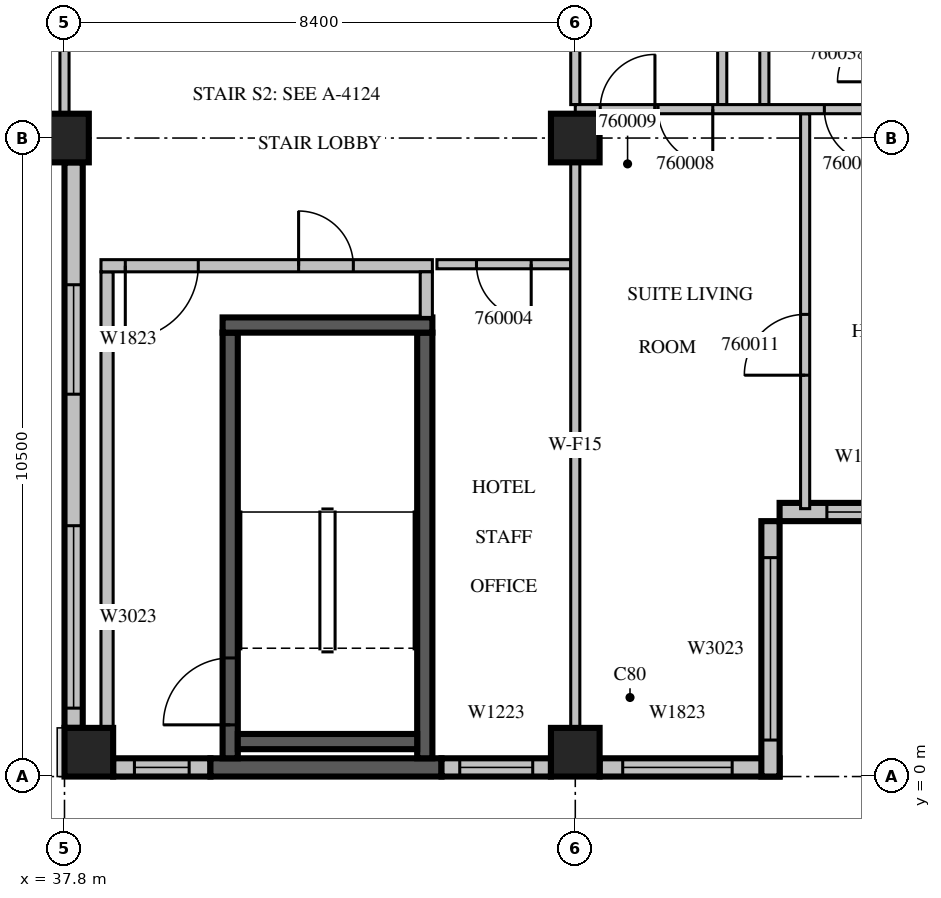
"""IFC4 building model, lengths in metres.
Left out: names, types, materials, properties, quantities, classifications, styles, units other than length and angle.
Written with IfcOpenShell. Run it as: python <this file> out.ifc"""

import sys

from ifc_helpers import new_model, si_unit, direction, frame, frame_2d, origin, origin_2d, place, context, subcontext, project, spatial, rectangle, extrude, source, transform, mapped, element, fill, save


model = new_model("IFC4")
c1 = context("Model", 3, precision=1e-05, world=origin(), true_north=direction((0.0, 1.0)))
c2 = subcontext(c1, "Body", "Model", "MODEL_VIEW")
j1 = project(units=[si_unit("LENGTHUNIT", "METRE"), si_unit("PLANEANGLEUNIT", "RADIAN")], contexts=[c1])
p1 = place(None, origin())
s1 = spatial("IfcSite", under=j1, at=p1, CompositionType="ELEMENT")
p2 = place(p1, origin())
s2 = spatial("IfcBuilding", under=s1, at=p2, CompositionType="ELEMENT")
p3 = place(p2, frame((0.0, 0.0, 261.4)))
s3 = spatial("IfcBuildingStorey", under=s2, at=p3, CompositionType="ELEMENT", Elevation=261.4)
m1 = source(origin(), c2, "Body", "SweptSolid", [
    extrude(rectangle(XDim=0.8, YDim=0.8, at=origin_2d()), origin(), (0.0, 0.0, 1.0), 3.8),
])
for number, where, z_axis, x_axis in (
    (1, (38.2, 0.4, 0.0), (0.0, 0.0, 1.0), (1.0, 0.0, 0.0)),
    (2, (46.2, 0.4, 0.0), (0.0, 0.0, 1.0), (1.0, 0.0, 0.0)),
    (3, (37.8, 10.5, 0.0), (0.0, 0.0, 1.0), (1.0, 0.0, 0.0)),
    (4, (46.2, 10.5, 0.0), (0.0, 0.0, 1.0), (1.0, 0.0, 0.0)),
):
    element("IfcColumn", number, at=place(p3, frame(where, z_axis=z_axis, x_axis=x_axis)), inside=s3, PredefinedType="COLUMN", context=c2, shape_type="MappedRepresentation", body=[
        mapped(m1, transform((0.0, 0.0, 0.0), scale=1.0)),
    ])
m2 = source(origin(), c2, "Body", "SweptSolid", [
    extrude(rectangle(XDim=9.3, YDim=0.3, at=frame_2d((4.65, 0.0))), origin(), (0.0, 0.0, 1.0), 3.4),
])
p4 = place(p3, frame((37.95, 10.1, 0.0), z_axis=(0.0, 0.0, 1.0), x_axis=(0.0, -1.0, 0.0)))
e5 = element("IfcWall", 5, at=p4, inside=s3, PredefinedType="STANDARD", context=c2, shape_type="MappedRepresentation", body=[
    mapped(m2, transform((0.0, 0.0, 0.0), scale=1.0)),
])
m3 = source(origin(), c2, "Body", "SweptSolid", [
    extrude(rectangle(XDim=1.8, YDim=2.3, at=frame_2d((0.9, 1.15))), frame((0.0, 0.16, 0.0), z_axis=(0.0, -1.0, 0.0), x_axis=(1.0, 0.0, 0.0)), (0.0, 0.0, 1.0), 0.32),
])
p5 = place(p4, frame((2.013, 0.0, 0.6)))
e6 = element("IfcOpeningElement", 6, at=p5, cuts=e5, PredefinedType="OPENING", context=c2, shape_type="MappedRepresentation", body=[
    mapped(m3, transform((0.0, 0.0, 0.0), scale=1.0)),
])
m4 = source(origin(), c2, "Body", "SweptSolid", [
    extrude(rectangle(XDim=3.0, YDim=2.3, at=frame_2d((1.5, 1.15))), frame((0.0, 0.16, 0.0), z_axis=(0.0, -1.0, 0.0), x_axis=(1.0, 0.0, 0.0)), (0.0, 0.0, 1.0), 0.32),
])
p6 = place(p4, frame((5.975, 0.0, 0.6)))
e7 = element("IfcOpeningElement", 7, at=p6, cuts=e5, PredefinedType="OPENING", context=c2, shape_type="MappedRepresentation", body=[
    mapped(m4, transform((0.0, 0.0, 0.0), scale=1.0)),
])
m5 = source(origin(), c2, "Body", "SweptSolid", [
    extrude(rectangle(XDim=1.6, YDim=0.3, at=frame_2d((0.8, 0.0))), origin(), (0.0, 0.0, 1.0), 3.4),
])
p7 = place(p3, frame((38.6, 0.15, 0.0), z_axis=(0.0, 0.0, 1.0), x_axis=(1.0, 0.0, 0.0)))
e8 = element("IfcWall", 8, at=p7, inside=s3, PredefinedType="STANDARD", context=c2, shape_type="MappedRepresentation", body=[
    mapped(m5, transform((0.0, 0.0, 0.0), scale=1.0)),
])
m6 = source(origin(), c2, "Body", "SweptSolid", [
    extrude(rectangle(XDim=0.9, YDim=2.3, at=frame_2d((0.45, 1.15))), frame((0.0, 0.16, 0.0), z_axis=(0.0, -1.0, 0.0), x_axis=(1.0, 0.0, 0.0)), (0.0, 0.0, 1.0), 0.32),
])
p8 = place(p7, frame((0.35, 0.0, 0.6)))
e9 = element("IfcOpeningElement", 9, at=p8, cuts=e8, PredefinedType="OPENING", context=c2, shape_type="MappedRepresentation", body=[
    mapped(m6, transform((0.0, 0.0, 0.0), scale=1.0)),
])
m7 = source(origin(), c2, "Body", "SweptSolid", [
    extrude(rectangle(XDim=3.8, YDim=0.3, at=frame_2d((1.9, 0.0))), origin(), (0.0, 0.0, 1.0), 3.4),
])
p9 = place(p3, frame((40.2, 0.15, 0.0), z_axis=(0.0, 0.0, 1.0), x_axis=(1.0, 0.0, 0.0)))
e10 = element("IfcWall", 10, at=p9, inside=s3, PredefinedType="SOLIDWALL", context=c2, shape_type="MappedRepresentation", body=[
    mapped(m7, transform((0.0, 0.0, 0.0), scale=1.0)),
])
m8 = source(origin(), c2, "Body", "SweptSolid", [
    extrude(rectangle(XDim=1.8, YDim=0.3, at=frame_2d((0.9, 0.0))), origin(), (0.0, 0.0, 1.0), 3.4),
])
p10 = place(p3, frame((44.0, 0.15, 0.0), z_axis=(0.0, 0.0, 1.0), x_axis=(1.0, 0.0, 0.0)))
e11 = element("IfcWall", 11, at=p10, inside=s3, PredefinedType="STANDARD", context=c2, shape_type="MappedRepresentation", body=[
    mapped(m8, transform((0.0, 0.0, 0.0), scale=1.0)),
])
m9 = source(origin(), c2, "Body", "SweptSolid", [
    extrude(rectangle(XDim=1.2, YDim=2.3, at=frame_2d((0.6, 1.15))), frame((0.0, 0.16, 0.0), z_axis=(0.0, -1.0, 0.0), x_axis=(1.0, 0.0, 0.0)), (0.0, 0.0, 1.0), 0.32),
])
p11 = place(p10, frame((0.3, 0.0, 0.6)))
e12 = element("IfcOpeningElement", 12, at=p11, cuts=e11, PredefinedType="OPENING", context=c2, shape_type="MappedRepresentation", body=[
    mapped(m9, transform((0.0, 0.0, 0.0), scale=1.0)),
])
m10 = source(origin(), c2, "Body", "SweptSolid", [
    extrude(rectangle(XDim=2.96, YDim=0.3, at=frame_2d((1.48, 0.0))), origin(), (0.0, 0.0, 1.0), 3.4),
])
p12 = place(p3, frame((46.6, 0.15, 0.0), z_axis=(0.0, 0.0, 1.0), x_axis=(1.0, 0.0, 0.0)))
e13 = element("IfcWall", 13, at=p12, inside=s3, PredefinedType="STANDARD", context=c2, shape_type="MappedRepresentation", body=[
    mapped(m10, transform((0.0, 0.0, 0.0), scale=1.0)),
])
p13 = place(p12, frame((0.38, 0.0, 0.6)))
e14 = element("IfcOpeningElement", 14, at=p13, cuts=e13, PredefinedType="OPENING", context=c2, shape_type="MappedRepresentation", body=[
    mapped(m3, transform((0.0, 0.0, 0.0), scale=1.0)),
])
m11 = source(origin(), c2, "Body", "SweptSolid", [
    extrude(rectangle(XDim=4.2, YDim=0.3, at=frame_2d((2.1, 0.0))), origin(), (0.0, 0.0, 1.0), 3.4),
])
p14 = place(p3, frame((49.41, 0.0, 0.0), z_axis=(0.0, 0.0, 1.0), x_axis=(0.0, 1.0, 0.0)))
e15 = element("IfcWall", 15, at=p14, inside=s3, PredefinedType="STANDARD", context=c2, shape_type="MappedRepresentation", body=[
    mapped(m11, transform((0.0, 0.0, 0.0), scale=1.0)),
])
p15 = place(p14, frame((0.6, 0.0, 0.6)))
e16 = element("IfcOpeningElement", 16, at=p15, cuts=e15, PredefinedType="OPENING", context=c2, shape_type="MappedRepresentation", body=[
    mapped(m4, transform((0.0, 0.0, 0.0), scale=1.0)),
])
m12 = source(origin(), c2, "Body", "SweptSolid", [
    extrude(rectangle(XDim=2.52, YDim=0.3, at=frame_2d((1.26, 0.0))), origin(), (0.0, 0.0, 1.0), 3.4),
])
p16 = place(p3, frame((49.56, 4.35, 0.0), z_axis=(0.0, 0.0, 1.0), x_axis=(1.0, 0.0, 0.0)))
e17 = element("IfcWall", 17, at=p16, inside=s3, PredefinedType="STANDARD", context=c2, shape_type="MappedRepresentation", body=[
    mapped(m12, transform((0.0, 0.0, 0.0), scale=1.0)),
])
p17 = place(p16, frame((0.777, 0.0, 0.6)))
e18 = element("IfcOpeningElement", 18, at=p17, cuts=e17, PredefinedType="OPENING", context=c2, shape_type="MappedRepresentation", body=[
    mapped(m9, transform((0.0, 0.0, 0.0), scale=1.0)),
])
m13 = source(origin(), c2, "Body", "SweptSolid", [
    extrude(rectangle(XDim=7.0, YDim=0.25, at=frame_2d((3.5, 0.0))), origin(), (0.0, 0.0, 1.0), 3.4),
])
p18 = place(p3, frame((40.525, 0.3, 0.0), z_axis=(0.0, 0.0, 1.0), x_axis=(0.0, 1.0, 0.0)))
e19 = element("IfcWall", 19, at=p18, inside=s3, PredefinedType="SOLIDWALL", context=c2, shape_type="MappedRepresentation", body=[
    mapped(m13, transform((0.0, 0.0, 0.0), scale=1.0)),
])
m14 = source(origin(), c2, "Body", "SweptSolid", [
    extrude(rectangle(XDim=1.1, YDim=2.1, at=frame_2d((0.55, 1.05))), frame((0.0, 0.135, 0.0), z_axis=(0.0, -1.0, 0.0), x_axis=(1.0, 0.0, 0.0)), (0.0, 0.0, 1.0), 0.27),
])
p19 = place(p18, frame((0.55, 0.0, 0.0)))
e20 = element("IfcOpeningElement", 20, at=p19, cuts=e19, PredefinedType="OPENING", context=c2, shape_type="MappedRepresentation", body=[
    mapped(m14, transform((0.0, 0.0, 0.0), scale=1.0)),
])
p20 = place(p3, frame((43.725, 0.3, 0.0), z_axis=(0.0, 0.0, 1.0), x_axis=(0.0, 1.0, 0.0)))
e21 = element("IfcWall", 21, at=p20, inside=s3, PredefinedType="SOLIDWALL", context=c2, shape_type="MappedRepresentation", body=[
    mapped(m13, transform((0.0, 0.0, 0.0), scale=1.0)),
])
m15 = source(origin(), c2, "Body", "SweptSolid", [
    extrude(rectangle(XDim=3.45, YDim=0.25, at=frame_2d((1.725, 0.0))), origin(), (0.0, 0.0, 1.0), 3.4),
])
p21 = place(p3, frame((40.4, 7.425, 0.0), z_axis=(0.0, 0.0, 1.0), x_axis=(1.0, 0.0, 0.0)))
e22 = element("IfcWall", 22, at=p21, inside=s3, PredefinedType="SOLIDWALL", context=c2, shape_type="MappedRepresentation", body=[
    mapped(m15, transform((0.0, 0.0, 0.0), scale=1.0)),
])
m16 = source(origin(), c2, "Body", "SweptSolid", [
    extrude(rectangle(XDim=2.95, YDim=0.25, at=frame_2d((1.475, 0.0))), origin(), (0.0, 0.0, 1.0), 3.4),
])
p22 = place(p3, frame((40.65, 0.575, 0.0), z_axis=(0.0, 0.0, 1.0), x_axis=(1.0, 0.0, 0.0)))
e23 = element("IfcWall", 23, at=p22, inside=s3, PredefinedType="SOLIDWALL", context=c2, shape_type="MappedRepresentation", body=[
    mapped(m16, transform((0.0, 0.0, 0.0), scale=1.0)),
])
m17 = source(origin(), c2, "Body", "SweptSolid", [
    extrude(rectangle(XDim=8.0, YDim=0.2, at=frame_2d((4.0, 0.0))), origin(), (0.0, 0.0, 1.0), 3.4),
])
p23 = place(p3, frame((38.5, 0.3, 0.0), z_axis=(0.0, 0.0, 1.0), x_axis=(0.0, 1.0, 0.0)))
e24 = element("IfcWall", 24, at=p23, inside=s3, PredefinedType="PARTITIONING", context=c2, shape_type="MappedRepresentation", body=[
    mapped(m17, transform((0.0, 0.0, 0.0), scale=1.0)),
])
m18 = source(origin(), c2, "Body", "SweptSolid", [
    extrude(rectangle(XDim=5.45, YDim=0.2, at=frame_2d((2.725, 0.0))), origin(), (0.0, 0.0, 1.0), 3.4),
])
p24 = place(p3, frame((38.4, 8.4, 0.0), z_axis=(0.0, 0.0, 1.0), x_axis=(1.0, 0.0, 0.0)))
e25 = element("IfcWall", 25, at=p24, inside=s3, PredefinedType="PARTITIONING", context=c2, shape_type="MappedRepresentation", body=[
    mapped(m18, transform((0.0, 0.0, 0.0), scale=1.0)),
])
m19 = source(origin(), c2, "Body", "SweptSolid", [
    extrude(rectangle(XDim=1.2, YDim=2.1, at=frame_2d((0.6, 1.05))), frame((0.0, 0.11, 0.0), z_axis=(0.0, -1.0, 0.0), x_axis=(1.0, 0.0, 0.0)), (0.0, 0.0, 1.0), 0.22),
])
p25 = place(p24, frame((0.4, 0.0, 0.0)))
e26 = element("IfcOpeningElement", 26, at=p25, cuts=e25, PredefinedType="OPENING", context=c2, shape_type="MappedRepresentation", body=[
    mapped(m19, transform((0.0, 0.0, 0.0), scale=1.0)),
])
m20 = source(origin(), c2, "Body", "SweptSolid", [
    extrude(rectangle(XDim=0.9, YDim=2.1, at=frame_2d((0.45, 1.05))), frame((0.0, 0.11, 0.0), z_axis=(0.0, -1.0, 0.0), x_axis=(1.0, 0.0, 0.0)), (0.0, 0.0, 1.0), 0.22),
])
p26 = place(p24, frame((3.25, 0.0, 0.0)))
e27 = element("IfcOpeningElement", 27, at=p26, cuts=e25, PredefinedType="OPENING", context=c2, shape_type="MappedRepresentation", body=[
    mapped(m20, transform((0.0, 0.0, 0.0), scale=1.0)),
])
m21 = source(origin(), c2, "Body", "SweptSolid", [
    extrude(rectangle(XDim=0.75, YDim=0.2, at=frame_2d((0.375, 0.0))), origin(), (0.0, 0.0, 1.0), 3.4),
])
p27 = place(p3, frame((43.75, 7.55, 0.0), z_axis=(0.0, 0.0, 1.0), x_axis=(0.0, 1.0, 0.0)))
e28 = element("IfcWall", 28, at=p27, inside=s3, PredefinedType="PARTITIONING", context=c2, shape_type="MappedRepresentation", body=[
    mapped(m21, transform((0.0, 0.0, 0.0), scale=1.0)),
])
m22 = source(origin(), c2, "Body", "SweptSolid", [
    extrude(rectangle(XDim=2.2, YDim=0.15, at=frame_2d((1.1, 0.0))), origin(), (0.0, 0.0, 1.0), 3.4),
])
p28 = place(p3, frame((46.125, 8.425, 0.0), z_axis=(0.0, 0.0, 1.0), x_axis=(-1.0, 0.0, 0.0)))
e29 = element("IfcWall", 29, at=p28, inside=s3, PredefinedType="PARTITIONING", context=c2, shape_type="MappedRepresentation", body=[
    mapped(m22, transform((0.0, 0.0, 0.0), scale=1.0)),
])
m23 = source(origin(), c2, "Body", "SweptSolid", [
    extrude(rectangle(XDim=0.9, YDim=2.1, at=frame_2d((0.45, 1.05))), frame((0.0, 0.085, 0.0), z_axis=(0.0, -1.0, 0.0), x_axis=(1.0, 0.0, 0.0)), (0.0, 0.0, 1.0), 0.17),
])
p29 = place(p28, frame((0.65, 0.0, 0.0)))
e30 = element("IfcOpeningElement", 30, at=p29, cuts=e29, PredefinedType="OPENING", context=c2, shape_type="MappedRepresentation", body=[
    mapped(m23, transform((0.0, 0.0, 0.0), scale=1.0)),
])
m24 = source(origin(), c2, "Body", "SweptSolid", [
    extrude(rectangle(XDim=3.801, YDim=0.15, at=frame_2d((1.901, 0.0))), origin(), (0.0, 0.0, 1.0), 3.4),
])
p30 = place(p3, frame((37.8, 10.899, 0.0), z_axis=(0.0, 0.0, 1.0), x_axis=(0.0, 1.0, 0.0)))
e31 = element("IfcWall", 31, at=p30, inside=s3, PredefinedType="PARTITIONING", context=c2, shape_type="MappedRepresentation", body=[
    mapped(m24, transform((0.0, 0.0, 0.0), scale=1.0)),
])
m25 = source(origin(), c2, "Body", "SweptSolid", [
    extrude(rectangle(XDim=6.495, YDim=0.15, at=frame_2d((3.248, 0.0))), origin(), (0.0, 0.0, 1.0), 3.4),
])
p31 = place(p3, frame((49.98, 4.405, 0.0), z_axis=(0.0, 0.0, 1.0), x_axis=(0.0, 1.0, 0.0)))
e32 = element("IfcWall", 32, at=p31, inside=s3, PredefinedType="PARTITIONING", context=c2, shape_type="MappedRepresentation", body=[
    mapped(m25, transform((0.0, 0.0, 0.0), scale=1.0)),
])
m26 = source(origin(), c2, "Body", "SweptSolid", [
    extrude(rectangle(XDim=1.0, YDim=2.1, at=frame_2d((0.5, 1.05))), frame((0.0, 0.085, 0.0), z_axis=(0.0, -1.0, 0.0), x_axis=(1.0, 0.0, 0.0)), (0.0, 0.0, 1.0), 0.17),
])
p32 = place(p31, frame((2.195, 0.0, 0.0)))
e33 = element("IfcOpeningElement", 33, at=p32, cuts=e32, PredefinedType="OPENING", context=c2, shape_type="MappedRepresentation", body=[
    mapped(m26, transform((0.0, 0.0, 0.0), scale=1.0)),
])
m27 = source(origin(), c2, "Body", "SweptSolid", [
    extrude(rectangle(XDim=3.65, YDim=0.15, at=frame_2d((1.825, 0.0))), origin(), (0.0, 0.0, 1.0), 3.4),
])
for number, where, z_axis, x_axis in (
    (34, (48.617, 11.05, 0.0), (0.0, 0.0, 1.0), (0.0, 1.0, 0.0)),
    (35, (49.309, 11.05, 0.0), (0.0, 0.0, 1.0), (0.0, 1.0, 0.0)),
):
    element("IfcWall", number, at=place(p3, frame(where, z_axis=z_axis, x_axis=x_axis)), inside=s3, PredefinedType="PARTITIONING", context=c2, shape_type="MappedRepresentation", body=[
        mapped(m27, transform((0.0, 0.0, 0.0), scale=1.0)),
    ])
m28 = source(origin(), c2, "Body", "SweptSolid", [
    extrude(rectangle(XDim=9.302, YDim=0.15, at=frame_2d((4.651, 0.0))), origin(), (0.0, 0.0, 1.0), 3.4),
])
p33 = place(p3, frame((46.2, 0.799, 0.0), z_axis=(0.0, 0.0, 1.0), x_axis=(0.0, 1.0, 0.0)))
e36 = element("IfcWall", 36, at=p33, inside=s3, PredefinedType="PARTITIONING", context=c2, shape_type="MappedRepresentation", body=[
    mapped(m28, transform((0.0, 0.0, 0.0), scale=1.0)),
])
p34 = place(p3, frame((46.2, 11.05, 0.0), z_axis=(0.0, 0.0, 1.0), x_axis=(0.0, 1.0, 0.0)))
e37 = element("IfcWall", 37, at=p34, inside=s3, PredefinedType="PARTITIONING", context=c2, shape_type="MappedRepresentation", body=[
    mapped(m27, transform((0.0, 0.0, 0.0), scale=1.0)),
])
m29 = source(origin(), c2, "Body", "SweptSolid", [
    extrude(rectangle(XDim=7.26, YDim=0.15, at=frame_2d((3.63, 0.0))), origin(), (0.0, 0.0, 1.0), 3.4),
])
p35 = place(p3, frame((53.46, 10.975, 0.0), z_axis=(0.0, 0.0, 1.0), x_axis=(-1.0, 0.0, 0.0)))
e38 = element("IfcWall", 38, at=p35, inside=s3, PredefinedType="PARTITIONING", context=c2, shape_type="MappedRepresentation", body=[
    mapped(m29, transform((0.0, 0.0, 0.0), scale=1.0)),
])
p36 = place(p35, frame((4.999, 0.0, 0.0)))
e39 = element("IfcOpeningElement", 39, at=p36, cuts=e38, PredefinedType="OPENING", context=c2, shape_type="MappedRepresentation", body=[
    mapped(m23, transform((0.0, 0.0, 0.0), scale=1.0)),
])
p37 = place(p35, frame((5.95, 0.0, 0.0)))
e40 = element("IfcOpeningElement", 40, at=p37, cuts=e38, PredefinedType="OPENING", context=c2, shape_type="MappedRepresentation", body=[
    mapped(m23, transform((0.0, 0.0, 0.0), scale=1.0)),
])
p38 = place(p35, frame((2.264, 0.0, 0.0)))
e41 = element("IfcOpeningElement", 41, at=p38, cuts=e38, PredefinedType="OPENING", context=c2, shape_type="MappedRepresentation", body=[
    mapped(m23, transform((0.0, 0.0, 0.0), scale=1.0)),
])
m30 = source(origin(), c2, "Body", "SweptSolid", [
    extrude(rectangle(XDim=1.8, YDim=2.3, at=frame_2d((0.9, 1.15))), frame((0.0, 0.03, 0.0), z_axis=(0.0, -1.0, 0.0), x_axis=(1.0, 0.0, 0.0)), (0.0, 0.0, 1.0), 0.06),
])
p39 = place(p5, origin())
e42 = element("IfcWindow", 42, at=p39, inside=s3, PartitioningType="SINGLE_PANEL", PredefinedType="WINDOW", context=c2, shape_type="MappedRepresentation", body=[
    mapped(m30, transform((0.0, 0.0, 0.0), scale=1.0)),
])
fill(e6, e42)
m31 = source(origin(), c2, "Body", "SweptSolid", [
    extrude(rectangle(XDim=3.0, YDim=2.3, at=frame_2d((1.5, 1.15))), frame((0.0, 0.03, 0.0), z_axis=(0.0, -1.0, 0.0), x_axis=(1.0, 0.0, 0.0)), (0.0, 0.0, 1.0), 0.06),
])
p40 = place(p6, origin())
e43 = element("IfcWindow", 43, at=p40, inside=s3, PartitioningType="SINGLE_PANEL", PredefinedType="WINDOW", context=c2, shape_type="MappedRepresentation", body=[
    mapped(m31, transform((0.0, 0.0, 0.0), scale=1.0)),
])
fill(e7, e43)
m32 = source(origin(), c2, "Body", "SweptSolid", [
    extrude(rectangle(XDim=0.9, YDim=2.3, at=frame_2d((0.45, 1.15))), frame((0.0, 0.03, 0.0), z_axis=(0.0, -1.0, 0.0), x_axis=(1.0, 0.0, 0.0)), (0.0, 0.0, 1.0), 0.06),
])
p41 = place(p8, origin())
e44 = element("IfcWindow", 44, at=p41, inside=s3, PartitioningType="SINGLE_PANEL", PredefinedType="WINDOW", context=c2, shape_type="MappedRepresentation", body=[
    mapped(m32, transform((0.0, 0.0, 0.0), scale=1.0)),
])
fill(e9, e44)
m33 = source(origin(), c2, "Body", "SweptSolid", [
    extrude(rectangle(XDim=1.2, YDim=2.3, at=frame_2d((0.6, 1.15))), frame((0.0, 0.03, 0.0), z_axis=(0.0, -1.0, 0.0), x_axis=(1.0, 0.0, 0.0)), (0.0, 0.0, 1.0), 0.06),
])
p42 = place(p11, origin())
e45 = element("IfcWindow", 45, at=p42, inside=s3, PartitioningType="SINGLE_PANEL", PredefinedType="WINDOW", context=c2, shape_type="MappedRepresentation", body=[
    mapped(m33, transform((0.0, 0.0, 0.0), scale=1.0)),
])
fill(e12, e45)
p43 = place(p13, origin())
e46 = element("IfcWindow", 46, at=p43, inside=s3, PartitioningType="SINGLE_PANEL", PredefinedType="WINDOW", context=c2, shape_type="MappedRepresentation", body=[
    mapped(m30, transform((0.0, 0.0, 0.0), scale=1.0)),
])
fill(e14, e46)
p44 = place(p15, origin())
e47 = element("IfcWindow", 47, at=p44, inside=s3, PartitioningType="SINGLE_PANEL", PredefinedType="WINDOW", context=c2, shape_type="MappedRepresentation", body=[
    mapped(m31, transform((0.0, 0.0, 0.0), scale=1.0)),
])
fill(e16, e47)
p45 = place(p17, origin())
e48 = element("IfcWindow", 48, at=p45, inside=s3, PartitioningType="SINGLE_PANEL", PredefinedType="WINDOW", context=c2, shape_type="MappedRepresentation", body=[
    mapped(m33, transform((0.0, 0.0, 0.0), scale=1.0)),
])
fill(e18, e48)
m34 = source(origin(), c2, "Body", "SweptSolid", [
    extrude(rectangle(XDim=1.1, YDim=2.1, at=frame_2d((0.55, 1.05))), frame((0.0, 0.025, 0.0), z_axis=(0.0, -1.0, 0.0), x_axis=(1.0, 0.0, 0.0)), (0.0, 0.0, 1.0), 0.05),
])
p46 = place(p19, origin())
e49 = element("IfcDoor", 49, at=p46, inside=s3, OperationType="SINGLE_SWING_LEFT", PredefinedType="DOOR", context=c2, shape_type="MappedRepresentation", body=[
    mapped(m34, transform((0.0, 0.0, 0.0), scale=1.0)),
])
fill(e20, e49)
m35 = source(origin(), c2, "Body", "SweptSolid", [
    extrude(rectangle(XDim=1.2, YDim=2.1, at=frame_2d((0.6, 1.05))), frame((0.0, 0.025, 0.0), z_axis=(0.0, -1.0, 0.0), x_axis=(1.0, 0.0, 0.0)), (0.0, 0.0, 1.0), 0.05),
])
p47 = place(p25, origin())
e50 = element("IfcDoor", 50, at=p47, inside=s3, OperationType="SINGLE_SWING_RIGHT", PredefinedType="DOOR", context=c2, shape_type="MappedRepresentation", body=[
    mapped(m35, transform((0.0, 0.0, 0.0), scale=1.0)),
])
fill(e26, e50)
m36 = source(origin(), c2, "Body", "SweptSolid", [
    extrude(rectangle(XDim=0.9, YDim=2.1, at=frame_2d((0.45, 1.05))), frame((0.0, 0.025, 0.0), z_axis=(0.0, -1.0, 0.0), x_axis=(1.0, 0.0, 0.0)), (0.0, 0.0, 1.0), 0.05),
])
p48 = place(p26, origin())
e51 = element("IfcDoor", 51, at=p48, inside=s3, OperationType="SINGLE_SWING_LEFT", PredefinedType="DOOR", context=c2, shape_type="MappedRepresentation", body=[
    mapped(m36, transform((0.0, 0.0, 0.0), scale=1.0)),
])
fill(e27, e51)
p49 = place(p29, origin())
e52 = element("IfcDoor", 52, at=p49, inside=s3, OperationType="SINGLE_SWING_LEFT", PredefinedType="DOOR", context=c2, shape_type="MappedRepresentation", body=[
    mapped(m36, transform((0.0, 0.0, 0.0), scale=1.0)),
])
fill(e30, e52)
p50 = place(p36, origin())
e53 = element("IfcDoor", 53, at=p50, inside=s3, OperationType="SINGLE_SWING_LEFT", PredefinedType="DOOR", context=c2, shape_type="MappedRepresentation", body=[
    mapped(m36, transform((0.0, 0.0, 0.0), scale=1.0)),
])
fill(e39, e53)
p51 = place(p37, origin())
e54 = element("IfcDoor", 54, at=p51, inside=s3, OperationType="SINGLE_SWING_RIGHT", PredefinedType="DOOR", context=c2, shape_type="MappedRepresentation", body=[
    mapped(m36, transform((0.0, 0.0, 0.0), scale=1.0)),
])
fill(e40, e54)
p52 = place(p38, origin())
e55 = element("IfcDoor", 55, at=p52, inside=s3, OperationType="SINGLE_SWING_LEFT", PredefinedType="DOOR", context=c2, shape_type="MappedRepresentation", body=[
    mapped(m36, transform((0.0, 0.0, 0.0), scale=1.0)),
])
fill(e41, e55)
m37 = source(origin(), c2, "Body", "SweptSolid", [
    extrude(rectangle(XDim=1.0, YDim=2.1, at=frame_2d((0.5, 1.05))), frame((0.0, 0.025, 0.0), z_axis=(0.0, -1.0, 0.0), x_axis=(1.0, 0.0, 0.0)), (0.0, 0.0, 1.0), 0.05),
])
p53 = place(p32, origin())
e56 = element("IfcDoor", 56, at=p53, inside=s3, OperationType="SINGLE_SWING_LEFT", PredefinedType="DOOR", context=c2, shape_type="MappedRepresentation", body=[
    mapped(m37, transform((0.0, 0.0, 0.0), scale=1.0)),
])
fill(e33, e56)
save(model, sys.argv[1])
